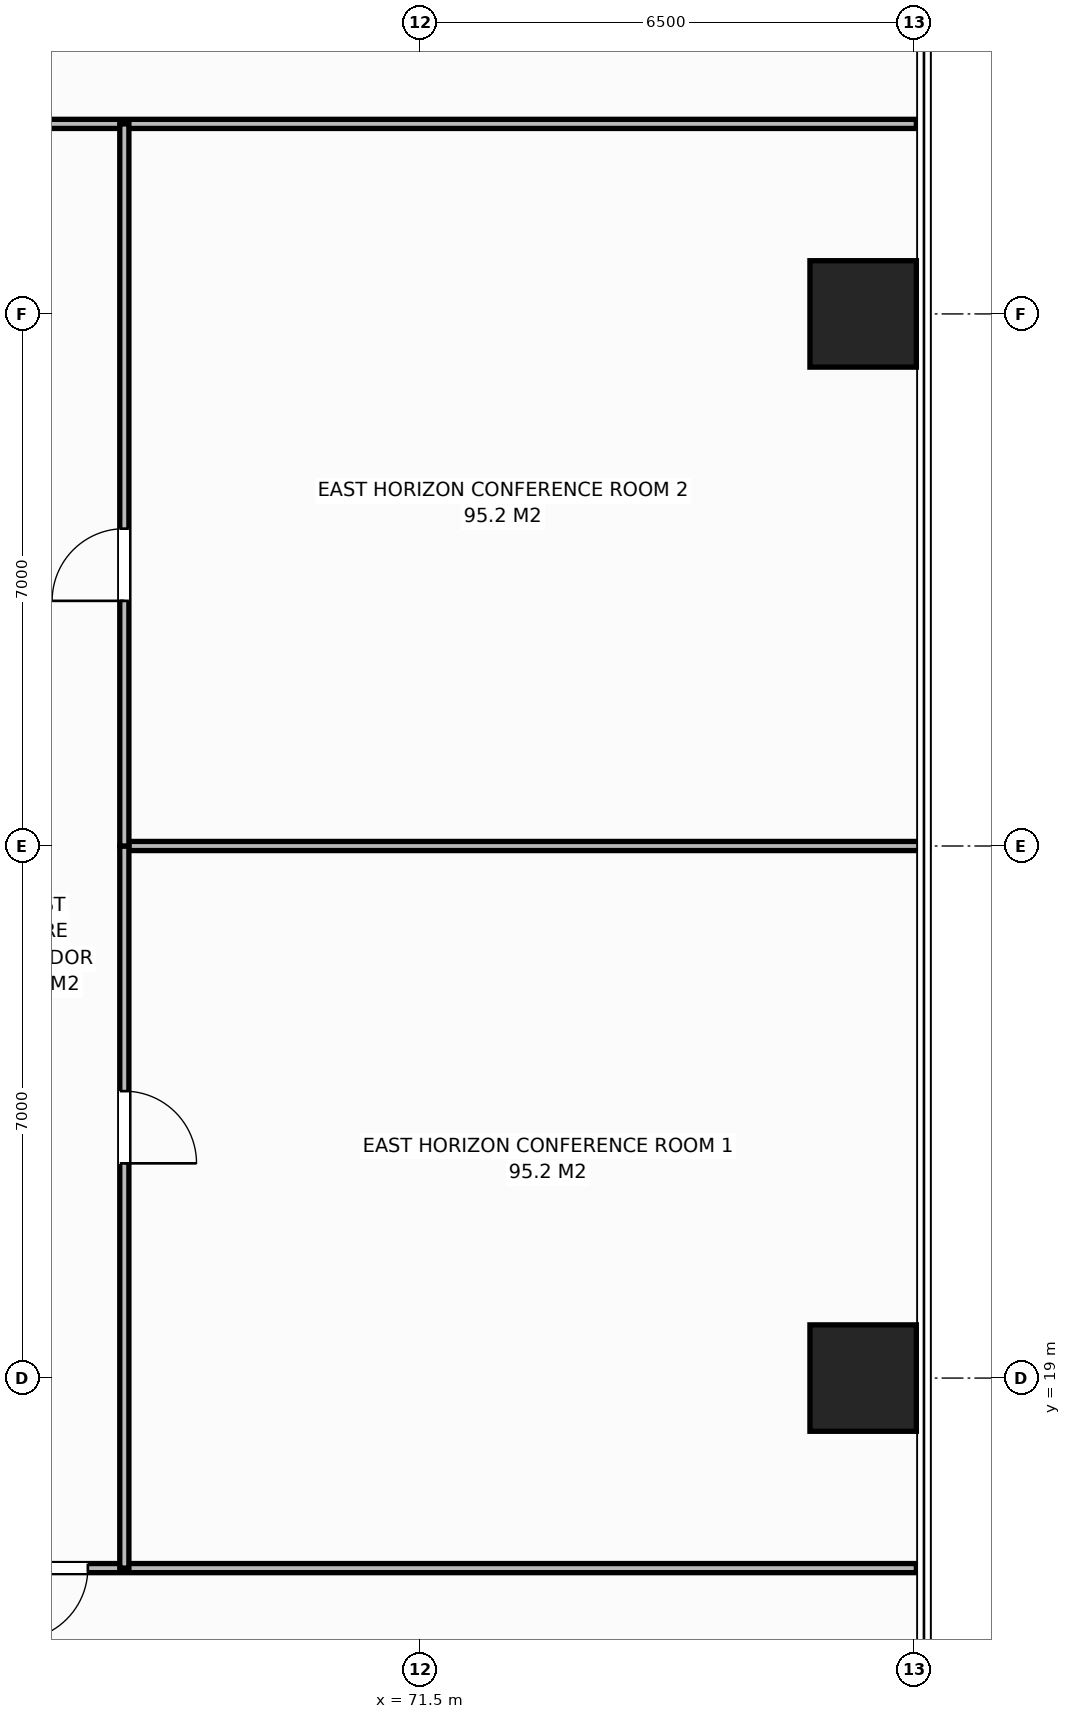
"""IFC4 building model, lengths in metres.
Left out: names, types, materials, properties, quantities, classifications, styles, units other than length and angle.
Written with IfcOpenShell. Run it as: python <this file> out.ifc"""

import sys

from ifc_helpers import new_model, si_unit, direction, frame, frame_2d, origin, origin_2d, place, context, subcontext, project, spatial, rectangle, extrude, element, fill, save


model = new_model("IFC4")
c1 = context("Model", 3, precision=1e-05, world=origin(), true_north=direction((0.0, 1.0)))
c2 = subcontext(c1, "Body", "Model", "MODEL_VIEW")
j1 = project(units=[si_unit("LENGTHUNIT", "METRE"), si_unit("PLANEANGLEUNIT", "RADIAN")], contexts=[c1])
p1 = place(None, origin())
s1 = spatial("IfcSite", under=j1, at=p1, CompositionType="ELEMENT")
p2 = place(p1, origin())
s2 = spatial("IfcBuilding", under=s1, at=p2, CompositionType="ELEMENT")
p3 = place(p2, frame((0.0, 0.0, 65.8)))
s3 = spatial("IfcBuildingStorey", under=s2, at=p3, CompositionType="ELEMENT", Elevation=65.8)
for number, where, z_axis, x_axis in (
    (1, (77.32, 19.0, 0.0), (0.0, 0.0, 1.0), (1.0, 0.0, 0.0)),
    (2, (77.32, 33.0, 0.0), (0.0, 0.0, 1.0), (1.0, 0.0, 0.0)),
):
    element("IfcColumn", number, at=place(p3, frame(where, z_axis=z_axis, x_axis=x_axis)), inside=s3, PredefinedType="COLUMN", context=c2, shape_type="SweptSolid", body=[
        extrude(rectangle(XDim=1.4, YDim=1.4, at=origin_2d()), origin(), (0.0, 0.0, 1.0), 3.8),
    ])
p4 = place(p3, frame((56.884, 35.5, 0.0), z_axis=(0.0, 0.0, 1.0), x_axis=(1.0, 0.0, 0.0)))
e3 = element("IfcWall", 3, at=p4, inside=s3, PredefinedType="PARTITIONING", context=c2, shape_type="SweptSolid", body=[
    extrude(rectangle(XDim=21.136, YDim=0.12, at=frame_2d((10.568, 0.0))), origin(), (0.0, 0.0, 1.0), 3.55),
])
p5 = place(p4, frame((4.883, 0.0, 0.0)))
e4 = element("IfcOpeningElement", 4, at=p5, cuts=e3, PredefinedType="OPENING", context=c2, shape_type="SweptSolid", body=[
    extrude(rectangle(XDim=0.95, YDim=2.15, at=frame_2d((0.475, 1.075))), frame((0.0, 0.07, 0.0), z_axis=(0.0, -1.0, 0.0), x_axis=(1.0, 0.0, 0.0)), (0.0, 0.0, 1.0), 0.14),
])
p6 = place(p3, frame((64.86, 16.5, 0.0), z_axis=(0.0, 0.0, 1.0), x_axis=(1.0, 0.0, 0.0)))
e5 = element("IfcWall", 5, at=p6, inside=s3, PredefinedType="PARTITIONING", context=c2, shape_type="SweptSolid", body=[
    extrude(rectangle(XDim=13.16, YDim=0.12, at=frame_2d((6.58, 0.0))), origin(), (0.0, 0.0, 1.0), 3.55),
])
p7 = place(p6, frame((1.31, 0.0, 0.0)))
e6 = element("IfcOpeningElement", 6, at=p7, cuts=e5, PredefinedType="OPENING", context=c2, shape_type="SweptSolid", body=[
    extrude(rectangle(XDim=0.95, YDim=2.15, at=frame_2d((0.475, 1.075))), frame((0.0, 0.07, 0.0), z_axis=(0.0, -1.0, 0.0), x_axis=(1.0, 0.0, 0.0)), (0.0, 0.0, 1.0), 0.14),
])
p8 = place(p3, frame((67.6, 26.0, 0.0), z_axis=(0.0, 0.0, 1.0), x_axis=(1.0, 0.0, 0.0)))
e7 = element("IfcWall", 7, at=p8, inside=s3, PredefinedType="PARTITIONING", context=c2, shape_type="SweptSolid", body=[
    extrude(rectangle(XDim=10.58, YDim=0.12, at=frame_2d((5.29, 0.0))), origin(), (0.0, 0.0, 1.0), 3.55),
])
p9 = place(p3, frame((67.6, 16.5, 0.0), z_axis=(0.0, 0.0, 1.0), x_axis=(0.0, 1.0, 0.0)))
e8 = element("IfcWall", 8, at=p9, inside=s3, PredefinedType="PARTITIONING", context=c2, shape_type="SweptSolid", body=[
    extrude(rectangle(XDim=9.5, YDim=0.12, at=frame_2d((4.75, 0.0))), origin(), (0.0, 0.0, 1.0), 3.55),
])
p10 = place(p9, frame((5.325, 0.0, 0.0)))
e9 = element("IfcOpeningElement", 9, at=p10, cuts=e8, PredefinedType="OPENING", context=c2, shape_type="SweptSolid", body=[
    extrude(rectangle(XDim=0.95, YDim=2.15, at=frame_2d((0.475, 1.075))), frame((0.0, 0.07, 0.0), z_axis=(0.0, -1.0, 0.0), x_axis=(1.0, 0.0, 0.0)), (0.0, 0.0, 1.0), 0.14),
])
p11 = place(p3, frame((67.6, 26.0, 0.0), z_axis=(0.0, 0.0, 1.0), x_axis=(0.0, 1.0, 0.0)))
e10 = element("IfcWall", 10, at=p11, inside=s3, PredefinedType="PARTITIONING", context=c2, shape_type="SweptSolid", body=[
    extrude(rectangle(XDim=9.5, YDim=0.12, at=frame_2d((4.75, 0.0))), origin(), (0.0, 0.0, 1.0), 3.55),
])
p12 = place(p11, frame((3.225, 0.0, 0.0)))
e11 = element("IfcOpeningElement", 11, at=p12, cuts=e10, PredefinedType="OPENING", context=c2, shape_type="SweptSolid", body=[
    extrude(rectangle(XDim=0.95, YDim=2.15, at=frame_2d((0.475, 1.075))), frame((0.0, 0.07, 0.0), z_axis=(0.0, -1.0, 0.0), x_axis=(1.0, 0.0, 0.0)), (0.0, 0.0, 1.0), 0.14),
])
p13 = place(p7, origin())
e12 = element("IfcDoor", 12, at=p13, inside=s3, OperationType="SINGLE_SWING_RIGHT", PredefinedType="DOOR", context=c2, shape_type="SweptSolid", body=[
    extrude(rectangle(XDim=0.95, YDim=2.15, at=frame_2d((0.475, 1.075))), frame((0.0, 0.025, 0.0), z_axis=(0.0, -1.0, 0.0), x_axis=(1.0, 0.0, 0.0)), (0.0, 0.0, 1.0), 0.05),
])
fill(e6, e12)
p14 = place(p10, origin())
e13 = element("IfcDoor", 13, at=p14, inside=s3, OperationType="SINGLE_SWING_RIGHT", PredefinedType="DOOR", context=c2, shape_type="SweptSolid", body=[
    extrude(rectangle(XDim=0.95, YDim=2.15, at=frame_2d((0.475, 1.075))), frame((0.0, 0.025, 0.0), z_axis=(0.0, -1.0, 0.0), x_axis=(1.0, 0.0, 0.0)), (0.0, 0.0, 1.0), 0.05),
])
fill(e9, e13)
p15 = place(p12, origin())
e14 = element("IfcDoor", 14, at=p15, inside=s3, OperationType="SINGLE_SWING_LEFT", PredefinedType="DOOR", context=c2, shape_type="SweptSolid", body=[
    extrude(rectangle(XDim=0.95, YDim=2.15, at=frame_2d((0.475, 1.075))), frame((0.0, 0.025, 0.0), z_axis=(0.0, -1.0, 0.0), x_axis=(1.0, 0.0, 0.0)), (0.0, 0.0, 1.0), 0.05),
])
fill(e11, e14)
save(model, sys.argv[1])
